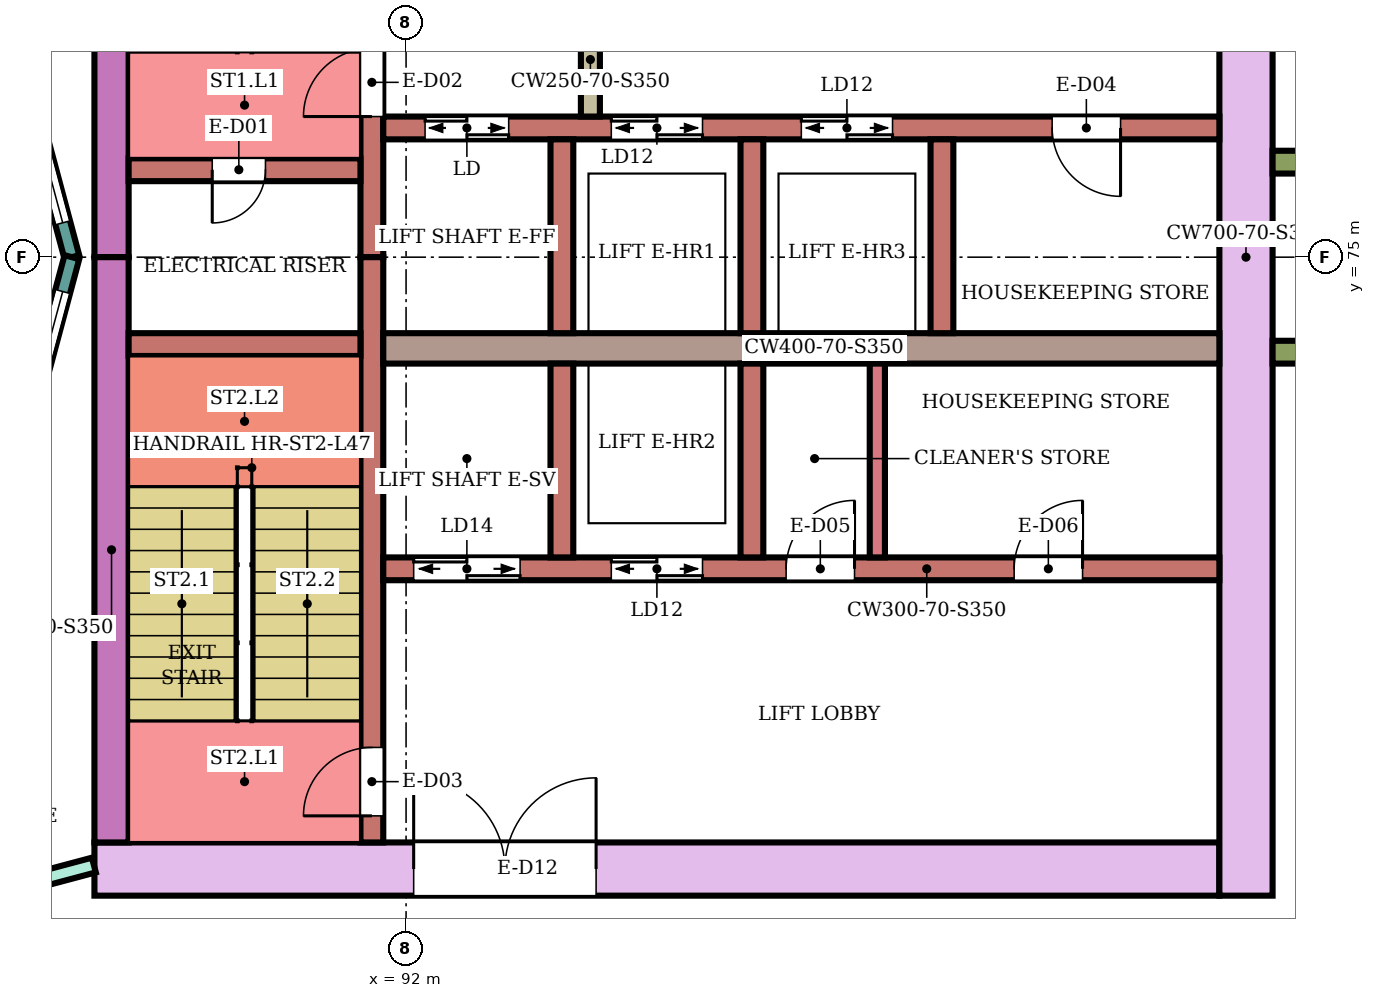
"""IFC4 building model, lengths in metres.
Left out: names, types, materials, properties, quantities, classifications, styles, units other than length and angle.
Written with IfcOpenShell. Run it as: python <this file> out.ifc"""

import sys

from ifc_helpers import new_model, si_unit, direction, frame, frame_2d, origin, place, context, subcontext, project, spatial, rectangle, extrude, element, fill, save


model = new_model("IFC4")
c1 = context("Model", 3, precision=1e-05, world=origin(), true_north=direction((0.0, 1.0)))
c2 = subcontext(c1, "Body", "Model", "MODEL_VIEW")
j1 = project(units=[si_unit("LENGTHUNIT", "METRE"), si_unit("PLANEANGLEUNIT", "RADIAN")], contexts=[c1])
p1 = place(None, origin())
s1 = spatial("IfcSite", under=j1, at=p1, CompositionType="ELEMENT")
p2 = place(p1, origin())
s2 = spatial("IfcBuilding", under=s1, at=p2, CompositionType="ELEMENT")
p3 = place(p2, frame((0.0, 0.0, 202.8)))
s3 = spatial("IfcBuildingStorey", under=s2, at=p3, CompositionType="ELEMENT", Elevation=202.8)
p4 = place(p3, frame((87.9, 66.95, 0.0), z_axis=(0.0, 0.0, 1.0), x_axis=(1.0, 0.0, 0.0)))
e1 = element("IfcWall", 1, at=p4, inside=s3, PredefinedType="SHEAR", context=c2, shape_type="SweptSolid", body=[
    extrude(rectangle(XDim=14.8, YDim=0.7, at=frame_2d((7.4, 0.0))), origin(), (0.0, 0.0, 1.0), 3.75),
])
p5 = place(p4, frame((4.2, 0.0, 0.0)))
e2 = element("IfcOpeningElement", 2, at=p5, cuts=e1, PredefinedType="OPENING", context=c2, shape_type="SweptSolid", body=[
    extrude(rectangle(XDim=2.4, YDim=2.4, at=frame_2d((1.2, 1.2))), frame((0.0, 0.36, 0.0), z_axis=(0.0, -1.0, 0.0), x_axis=(1.0, 0.0, 0.0)), (0.0, 0.0, 1.0), 0.72),
])
for number, where, z_axis, x_axis in (
    (3, (88.125, 75.0, 0.0), (0.0, 0.0, 1.0), (0.0, 1.0, 0.0)),
    (4, (88.125, 67.3, 0.0), (0.0, 0.0, 1.0), (0.0, 1.0, 0.0)),
):
    element("IfcWall", number, at=place(p3, frame(where, z_axis=z_axis, x_axis=x_axis)), inside=s3, PredefinedType="SHEAR", context=c2, shape_type="SweptSolid", body=[
        extrude(rectangle(XDim=7.7, YDim=0.45, at=frame_2d((3.85, 0.0))), origin(), (0.0, 0.0, 1.0), 3.75),
    ])
p6 = place(p3, frame((103.05, 66.6, 0.0), z_axis=(0.0, 0.0, 1.0), x_axis=(0.0, 1.0, 0.0)))
e5 = element("IfcWall", 5, at=p6, inside=s3, PredefinedType="SHEAR", context=c2, shape_type="SweptSolid", body=[
    extrude(rectangle(XDim=16.8, YDim=0.7, at=frame_2d((8.4, 0.0))), origin(), (0.0, 0.0, 1.0), 3.75),
])
p7 = place(p3, frame((91.55, 75.0, 0.0), z_axis=(0.0, 0.0, 1.0), x_axis=(0.0, 1.0, 0.0)))
e6 = element("IfcWall", 6, at=p7, inside=s3, PredefinedType="SHEAR", context=c2, shape_type="SweptSolid", body=[
    extrude(rectangle(XDim=7.7, YDim=0.3, at=frame_2d((3.85, 0.0))), origin(), (0.0, 0.0, 1.0), 3.75),
])
p8 = place(p7, frame((1.85, 0.0, 0.0)))
e7 = element("IfcOpeningElement", 7, at=p8, cuts=e6, PredefinedType="OPENING", context=c2, shape_type="SweptSolid", body=[
    extrude(rectangle(XDim=0.9, YDim=2.1, at=frame_2d((0.45, 1.05))), frame((0.0, 0.16, 0.0), z_axis=(0.0, -1.0, 0.0), x_axis=(1.0, 0.0, 0.0)), (0.0, 0.0, 1.0), 0.32),
])
p9 = place(p3, frame((91.55, 67.3, 0.0), z_axis=(0.0, 0.0, 1.0), x_axis=(0.0, 1.0, 0.0)))
e8 = element("IfcWall", 8, at=p9, inside=s3, PredefinedType="SHEAR", context=c2, shape_type="SweptSolid", body=[
    extrude(rectangle(XDim=7.7, YDim=0.3, at=frame_2d((3.85, 0.0))), origin(), (0.0, 0.0, 1.0), 3.75),
])
p10 = place(p9, frame((0.35, 0.0, 0.0)))
e9 = element("IfcOpeningElement", 9, at=p10, cuts=e8, PredefinedType="OPENING", context=c2, shape_type="SweptSolid", body=[
    extrude(rectangle(XDim=0.9, YDim=2.1, at=frame_2d((0.45, 1.05))), frame((0.0, 0.16, 0.0), z_axis=(0.0, -1.0, 0.0), x_axis=(1.0, 0.0, 0.0)), (0.0, 0.0, 1.0), 0.32),
])
p11 = place(p3, frame((88.35, 76.15, 0.0), z_axis=(0.0, 0.0, 1.0), x_axis=(1.0, 0.0, 0.0)))
e10 = element("IfcWall", 10, at=p11, inside=s3, PredefinedType="SHEAR", context=c2, shape_type="SweptSolid", body=[
    extrude(rectangle(XDim=3.05, YDim=0.3, at=frame_2d((1.525, 0.0))), origin(), (0.0, 0.0, 1.0), 3.75),
])
p12 = place(p11, frame((1.1, 0.0, 0.0)))
e11 = element("IfcOpeningElement", 11, at=p12, cuts=e10, PredefinedType="OPENING", context=c2, shape_type="SweptSolid", body=[
    extrude(rectangle(XDim=0.7, YDim=2.0, at=frame_2d((0.35, 1.0))), frame((0.0, 0.16, 0.0), z_axis=(0.0, -1.0, 0.0), x_axis=(1.0, 0.0, 0.0)), (0.0, 0.0, 1.0), 0.32),
])
p13 = place(p3, frame((88.35, 73.85, 0.0), z_axis=(0.0, 0.0, 1.0), x_axis=(1.0, 0.0, 0.0)))
e12 = element("IfcWall", 12, at=p13, inside=s3, PredefinedType="SHEAR", context=c2, shape_type="SweptSolid", body=[
    extrude(rectangle(XDim=3.05, YDim=0.3, at=frame_2d((1.525, 0.0))), origin(), (0.0, 0.0, 1.0), 3.75),
])
p14 = place(p3, frame((91.7, 76.7, 0.0), z_axis=(0.0, 0.0, 1.0), x_axis=(1.0, 0.0, 0.0)))
e13 = element("IfcWall", 13, at=p14, inside=s3, PredefinedType="SHEAR", context=c2, shape_type="SweptSolid", body=[
    extrude(rectangle(XDim=11.0, YDim=0.3, at=frame_2d((5.5, 0.0))), origin(), (0.0, 0.0, 1.0), 3.75),
])
p15 = place(p14, frame((0.55, 0.0, 0.0)))
e14 = element("IfcOpeningElement", 14, at=p15, cuts=e13, PredefinedType="OPENING", context=c2, shape_type="SweptSolid", body=[
    extrude(rectangle(XDim=1.1, YDim=2.1, at=frame_2d((0.55, 1.05))), frame((0.0, 0.16, 0.0), z_axis=(0.0, -1.0, 0.0), x_axis=(1.0, 0.0, 0.0)), (0.0, 0.0, 1.0), 0.32),
])
p16 = place(p14, frame((3.0, 0.0, 0.0)))
e15 = element("IfcOpeningElement", 15, at=p16, cuts=e13, PredefinedType="OPENING", context=c2, shape_type="SweptSolid", body=[
    extrude(rectangle(XDim=1.2, YDim=2.1, at=frame_2d((0.6, 1.05))), frame((0.0, 0.16, 0.0), z_axis=(0.0, -1.0, 0.0), x_axis=(1.0, 0.0, 0.0)), (0.0, 0.0, 1.0), 0.32),
])
p17 = place(p14, frame((5.5, 0.0, 0.0)))
e16 = element("IfcOpeningElement", 16, at=p17, cuts=e13, PredefinedType="OPENING", context=c2, shape_type="SweptSolid", body=[
    extrude(rectangle(XDim=1.2, YDim=2.1, at=frame_2d((0.6, 1.05))), frame((0.0, 0.16, 0.0), z_axis=(0.0, -1.0, 0.0), x_axis=(1.0, 0.0, 0.0)), (0.0, 0.0, 1.0), 0.32),
])
p18 = place(p14, frame((8.8, 0.0, 0.0)))
e17 = element("IfcOpeningElement", 17, at=p18, cuts=e13, PredefinedType="OPENING", context=c2, shape_type="SweptSolid", body=[
    extrude(rectangle(XDim=0.9, YDim=2.1, at=frame_2d((0.45, 1.05))), frame((0.0, 0.16, 0.0), z_axis=(0.0, -1.0, 0.0), x_axis=(1.0, 0.0, 0.0)), (0.0, 0.0, 1.0), 0.32),
])
p19 = place(p3, frame((91.7, 73.8, 0.0), z_axis=(0.0, 0.0, 1.0), x_axis=(1.0, 0.0, 0.0)))
e18 = element("IfcWall", 18, at=p19, inside=s3, PredefinedType="SHEAR", context=c2, shape_type="SweptSolid", body=[
    extrude(rectangle(XDim=11.0, YDim=0.4, at=frame_2d((5.5, 0.0))), origin(), (0.0, 0.0, 1.0), 3.75),
])
p20 = place(p3, frame((91.7, 70.9, 0.0), z_axis=(0.0, 0.0, 1.0), x_axis=(1.0, 0.0, 0.0)))
e19 = element("IfcWall", 19, at=p20, inside=s3, PredefinedType="SHEAR", context=c2, shape_type="SweptSolid", body=[
    extrude(rectangle(XDim=11.0, YDim=0.3, at=frame_2d((5.5, 0.0))), origin(), (0.0, 0.0, 1.0), 3.75),
])
p21 = place(p20, frame((0.4, 0.0, 0.0)))
e20 = element("IfcOpeningElement", 20, at=p21, cuts=e19, PredefinedType="OPENING", context=c2, shape_type="SweptSolid", body=[
    extrude(rectangle(XDim=1.4, YDim=2.1, at=frame_2d((0.7, 1.05))), frame((0.0, 0.16, 0.0), z_axis=(0.0, -1.0, 0.0), x_axis=(1.0, 0.0, 0.0)), (0.0, 0.0, 1.0), 0.32),
])
p22 = place(p20, frame((3.0, 0.0, 0.0)))
e21 = element("IfcOpeningElement", 21, at=p22, cuts=e19, PredefinedType="OPENING", context=c2, shape_type="SweptSolid", body=[
    extrude(rectangle(XDim=1.2, YDim=2.1, at=frame_2d((0.6, 1.05))), frame((0.0, 0.16, 0.0), z_axis=(0.0, -1.0, 0.0), x_axis=(1.0, 0.0, 0.0)), (0.0, 0.0, 1.0), 0.32),
])
p23 = place(p20, frame((5.3, 0.0, 0.0)))
e22 = element("IfcOpeningElement", 22, at=p23, cuts=e19, PredefinedType="OPENING", context=c2, shape_type="SweptSolid", body=[
    extrude(rectangle(XDim=0.9, YDim=2.1, at=frame_2d((0.45, 1.05))), frame((0.0, 0.16, 0.0), z_axis=(0.0, -1.0, 0.0), x_axis=(1.0, 0.0, 0.0)), (0.0, 0.0, 1.0), 0.32),
])
p24 = place(p20, frame((8.3, 0.0, 0.0)))
e23 = element("IfcOpeningElement", 23, at=p24, cuts=e19, PredefinedType="OPENING", context=c2, shape_type="SweptSolid", body=[
    extrude(rectangle(XDim=0.9, YDim=2.1, at=frame_2d((0.45, 1.05))), frame((0.0, 0.16, 0.0), z_axis=(0.0, -1.0, 0.0), x_axis=(1.0, 0.0, 0.0)), (0.0, 0.0, 1.0), 0.32),
])
for number, where, z_axis, x_axis in (
    (24, (94.05, 74.0, 0.0), (0.0, 0.0, 1.0), (0.0, 1.0, 0.0)),
    (25, (96.55, 74.0, 0.0), (0.0, 0.0, 1.0), (0.0, 1.0, 0.0)),
    (26, (99.05, 74.0, 0.0), (0.0, 0.0, 1.0), (0.0, 1.0, 0.0)),
    (27, (94.05, 71.05, 0.0), (0.0, 0.0, 1.0), (0.0, 1.0, 0.0)),
    (28, (96.55, 71.05, 0.0), (0.0, 0.0, 1.0), (0.0, 1.0, 0.0)),
):
    element("IfcWall", number, at=place(p3, frame(where, z_axis=z_axis, x_axis=x_axis)), inside=s3, PredefinedType="SHEAR", context=c2, shape_type="SweptSolid", body=[
        extrude(rectangle(XDim=2.55, YDim=0.3, at=frame_2d((1.275, 0.0))), origin(), (0.0, 0.0, 1.0), 3.75),
    ])
p25 = place(p3, frame((94.425, 76.85, 0.0), z_axis=(0.0, 0.0, 1.0), x_axis=(0.0, 1.0, 0.0)))
e29 = element("IfcWall", 29, at=p25, inside=s3, PredefinedType="SHEAR", context=c2, shape_type="SweptSolid", body=[
    extrude(rectangle(XDim=1.5, YDim=0.25, at=frame_2d((0.75, 0.0))), origin(), (0.0, 0.0, 1.0), 3.75),
])
for number, where, z_axis, x_axis in (
    (30, (103.4, 73.75, 0.0), (0.0, 0.0, 1.0), (1.0, 0.0, 0.0)),
    (31, (103.4, 76.25, 0.0), (0.0, 0.0, 1.0), (1.0, 0.0, 0.0)),
):
    element("IfcWall", number, at=place(p3, frame(where, z_axis=z_axis, x_axis=x_axis)), inside=s3, PredefinedType="NOTDEFINED", context=c2, shape_type="SweptSolid", body=[
        extrude(rectangle(XDim=2.416, YDim=0.3, at=frame_2d((1.208, 0.0))), origin(), (0.0, 0.0, 1.0), 4.1),
    ])
p26 = place(p3, frame((87.604, 75.0, 0.0), z_axis=(0.0, 0.0, 1.0), x_axis=(-0.258789828301, 0.965933654434, 0.0)))
e32 = element("IfcWall", 32, at=p26, inside=s3, PredefinedType="NOTDEFINED", context=c2, shape_type="SweptSolid", body=[
    extrude(rectangle(XDim=3.936, YDim=0.2, at=frame_2d((1.968, 0.0))), origin(), (0.0, 0.0, 1.0), 4.1),
])
p27 = place(p26, frame((0.468, 0.0, 0.9)))
e33 = element("IfcOpeningElement", 33, at=p27, cuts=e32, PredefinedType="OPENING", context=c2, shape_type="SweptSolid", body=[
    extrude(rectangle(XDim=3.0, YDim=2.3, at=frame_2d((1.5, 1.15))), frame((0.0, 0.11, 0.0), z_axis=(0.0, -1.0, 0.0), x_axis=(1.0, 0.0, 0.0)), (0.0, 0.0, 1.0), 0.22),
])
p28 = place(p3, frame((86.585, 71.198, 0.0), z_axis=(0.0, 0.0, 1.0), x_axis=(0.258789828301, 0.965933654434, 0.0)))
e34 = element("IfcWall", 34, at=p28, inside=s3, PredefinedType="NOTDEFINED", context=c2, shape_type="SweptSolid", body=[
    extrude(rectangle(XDim=3.936, YDim=0.2, at=frame_2d((1.968, 0.0))), origin(), (0.0, 0.0, 1.0), 4.1),
])
p29 = place(p28, frame((0.468, 0.0, 0.9)))
e35 = element("IfcOpeningElement", 35, at=p29, cuts=e34, PredefinedType="OPENING", context=c2, shape_type="SweptSolid", body=[
    extrude(rectangle(XDim=3.0, YDim=2.3, at=frame_2d((1.5, 1.15))), frame((0.0, 0.11, 0.0), z_axis=(0.0, -1.0, 0.0), x_axis=(1.0, 0.0, 0.0)), (0.0, 0.0, 1.0), 0.22),
])
p30 = place(p3, frame((80.0, 64.898, 0.0), z_axis=(0.0, 0.0, 1.0), x_axis=(0.966236923997, 0.25765520896, 0.0)))
e36 = element("IfcWall", 36, at=p30, inside=s3, PredefinedType="PARTITIONING", context=c2, shape_type="SweptSolid", body=[
    extrude(rectangle(XDim=8.168, YDim=0.2, at=frame_2d((4.084, 0.0))), origin(), (0.0, 0.0, 1.0), 3.65),
])
p31 = place(p30, frame((1.893, 0.0, 0.0)))
e37 = element("IfcOpeningElement", 37, at=p31, cuts=e36, PredefinedType="OPENING", context=c2, shape_type="SweptSolid", body=[
    extrude(rectangle(XDim=1.8, YDim=2.1, at=frame_2d((0.9, 1.05))), frame((0.0, 0.11, 0.0), z_axis=(0.0, -1.0, 0.0), x_axis=(1.0, 0.0, 0.0)), (0.0, 0.0, 1.0), 0.22),
])
p32 = place(p3, frame((98.2, 71.05, 0.0), z_axis=(0.0, 0.0, 1.0), x_axis=(0.0, 1.0, 0.0)))
e38 = element("IfcWall", 38, at=p32, inside=s3, PredefinedType="PARTITIONING", context=c2, shape_type="SweptSolid", body=[
    extrude(rectangle(XDim=2.55, YDim=0.2, at=frame_2d((1.275, 0.0))), origin(), (0.0, 0.0, 1.0), 3.75),
])
p33 = place(p27, origin())
e39 = element("IfcWindow", 39, at=p33, inside=s3, PartitioningType="SINGLE_PANEL", PredefinedType="WINDOW", context=c2, shape_type="SweptSolid", body=[
    extrude(rectangle(XDim=3.0, YDim=2.3, at=frame_2d((1.5, 1.15))), frame((0.0, 0.03, 0.0), z_axis=(0.0, -1.0, 0.0), x_axis=(1.0, 0.0, 0.0)), (0.0, 0.0, 1.0), 0.06),
])
fill(e33, e39)
p34 = place(p29, origin())
e40 = element("IfcWindow", 40, at=p34, inside=s3, PartitioningType="SINGLE_PANEL", PredefinedType="WINDOW", context=c2, shape_type="SweptSolid", body=[
    extrude(rectangle(XDim=3.0, YDim=2.3, at=frame_2d((1.5, 1.15))), frame((0.0, 0.03, 0.0), z_axis=(0.0, -1.0, 0.0), x_axis=(1.0, 0.0, 0.0)), (0.0, 0.0, 1.0), 0.06),
])
fill(e35, e40)
p35 = place(p12, frame((0.7, 0.0, 0.0), z_axis=(0.0, 0.0, 1.0), x_axis=(-1.0, 0.0, 0.0)))
e41 = element("IfcDoor", 41, at=p35, inside=s3, OperationType="SINGLE_SWING_RIGHT", PredefinedType="DOOR", context=c2, shape_type="SweptSolid", body=[
    extrude(rectangle(XDim=0.7, YDim=2.0, at=frame_2d((0.35, 1.0))), frame((0.0, 0.025, 0.0), z_axis=(0.0, -1.0, 0.0), x_axis=(1.0, 0.0, 0.0)), (0.0, 0.0, 1.0), 0.05),
])
fill(e11, e41)
p36 = place(p8, origin())
e42 = element("IfcDoor", 42, at=p36, inside=s3, OperationType="SINGLE_SWING_LEFT", PredefinedType="DOOR", context=c2, shape_type="SweptSolid", body=[
    extrude(rectangle(XDim=0.9, YDim=2.1, at=frame_2d((0.45, 1.05))), frame((0.0, 0.025, 0.0), z_axis=(0.0, -1.0, 0.0), x_axis=(1.0, 0.0, 0.0)), (0.0, 0.0, 1.0), 0.05),
])
fill(e7, e42)
p37 = place(p10, origin())
e43 = element("IfcDoor", 43, at=p37, inside=s3, OperationType="SINGLE_SWING_LEFT", PredefinedType="DOOR", context=c2, shape_type="SweptSolid", body=[
    extrude(rectangle(XDim=0.9, YDim=2.1, at=frame_2d((0.45, 1.05))), frame((0.0, 0.025, 0.0), z_axis=(0.0, -1.0, 0.0), x_axis=(1.0, 0.0, 0.0)), (0.0, 0.0, 1.0), 0.05),
])
fill(e9, e43)
p38 = place(p15, origin())
e44 = element("IfcDoor", 44, at=p38, inside=s3, OperationType="DOUBLE_DOOR_SLIDING", PredefinedType="DOOR", context=c2, shape_type="SweptSolid", body=[
    extrude(rectangle(XDim=1.1, YDim=2.1, at=frame_2d((0.55, 1.05))), frame((0.0, 0.025, 0.0), z_axis=(0.0, -1.0, 0.0), x_axis=(1.0, 0.0, 0.0)), (0.0, 0.0, 1.0), 0.05),
])
fill(e14, e44)
p39 = place(p16, origin())
e45 = element("IfcDoor", 45, at=p39, inside=s3, OperationType="DOUBLE_DOOR_SLIDING", PredefinedType="DOOR", context=c2, shape_type="SweptSolid", body=[
    extrude(rectangle(XDim=1.2, YDim=2.1, at=frame_2d((0.6, 1.05))), frame((0.0, 0.025, 0.0), z_axis=(0.0, -1.0, 0.0), x_axis=(1.0, 0.0, 0.0)), (0.0, 0.0, 1.0), 0.05),
])
fill(e15, e45)
p40 = place(p17, origin())
e46 = element("IfcDoor", 46, at=p40, inside=s3, OperationType="DOUBLE_DOOR_SLIDING", PredefinedType="DOOR", context=c2, shape_type="SweptSolid", body=[
    extrude(rectangle(XDim=1.2, YDim=2.1, at=frame_2d((0.6, 1.05))), frame((0.0, 0.025, 0.0), z_axis=(0.0, -1.0, 0.0), x_axis=(1.0, 0.0, 0.0)), (0.0, 0.0, 1.0), 0.05),
])
fill(e16, e46)
p41 = place(p18, frame((0.9, 0.0, 0.0), z_axis=(0.0, 0.0, 1.0), x_axis=(-1.0, 0.0, 0.0)))
e47 = element("IfcDoor", 47, at=p41, inside=s3, OperationType="SINGLE_SWING_LEFT", PredefinedType="DOOR", context=c2, shape_type="SweptSolid", body=[
    extrude(rectangle(XDim=0.9, YDim=2.1, at=frame_2d((0.45, 1.05))), frame((0.0, 0.025, 0.0), z_axis=(0.0, -1.0, 0.0), x_axis=(1.0, 0.0, 0.0)), (0.0, 0.0, 1.0), 0.05),
])
fill(e17, e47)
p42 = place(p21, origin())
e48 = element("IfcDoor", 48, at=p42, inside=s3, OperationType="DOUBLE_DOOR_SLIDING", PredefinedType="DOOR", context=c2, shape_type="SweptSolid", body=[
    extrude(rectangle(XDim=1.4, YDim=2.1, at=frame_2d((0.7, 1.05))), frame((0.0, 0.025, 0.0), z_axis=(0.0, -1.0, 0.0), x_axis=(1.0, 0.0, 0.0)), (0.0, 0.0, 1.0), 0.05),
])
fill(e20, e48)
p43 = place(p22, origin())
e49 = element("IfcDoor", 49, at=p43, inside=s3, OperationType="DOUBLE_DOOR_SLIDING", PredefinedType="DOOR", context=c2, shape_type="SweptSolid", body=[
    extrude(rectangle(XDim=1.2, YDim=2.1, at=frame_2d((0.6, 1.05))), frame((0.0, 0.025, 0.0), z_axis=(0.0, -1.0, 0.0), x_axis=(1.0, 0.0, 0.0)), (0.0, 0.0, 1.0), 0.05),
])
fill(e21, e49)
p44 = place(p23, origin())
e50 = element("IfcDoor", 50, at=p44, inside=s3, OperationType="SINGLE_SWING_RIGHT", PredefinedType="DOOR", context=c2, shape_type="SweptSolid", body=[
    extrude(rectangle(XDim=0.9, YDim=2.1, at=frame_2d((0.45, 1.05))), frame((0.0, 0.025, 0.0), z_axis=(0.0, -1.0, 0.0), x_axis=(1.0, 0.0, 0.0)), (0.0, 0.0, 1.0), 0.05),
])
fill(e22, e50)
p45 = place(p24, origin())
e51 = element("IfcDoor", 51, at=p45, inside=s3, OperationType="SINGLE_SWING_RIGHT", PredefinedType="DOOR", context=c2, shape_type="SweptSolid", body=[
    extrude(rectangle(XDim=0.9, YDim=2.1, at=frame_2d((0.45, 1.05))), frame((0.0, 0.025, 0.0), z_axis=(0.0, -1.0, 0.0), x_axis=(1.0, 0.0, 0.0)), (0.0, 0.0, 1.0), 0.05),
])
fill(e23, e51)
p46 = place(p5, origin())
e52 = element("IfcDoor", 52, at=p46, inside=s3, OperationType="DOUBLE_DOOR_SINGLE_SWING", PredefinedType="DOOR", context=c2, shape_type="SweptSolid", body=[
    extrude(rectangle(XDim=2.4, YDim=2.4, at=frame_2d((1.2, 1.2))), frame((0.0, 0.025, 0.0), z_axis=(0.0, -1.0, 0.0), x_axis=(1.0, 0.0, 0.0)), (0.0, 0.0, 1.0), 0.05),
])
fill(e2, e52)
save(model, sys.argv[1])
